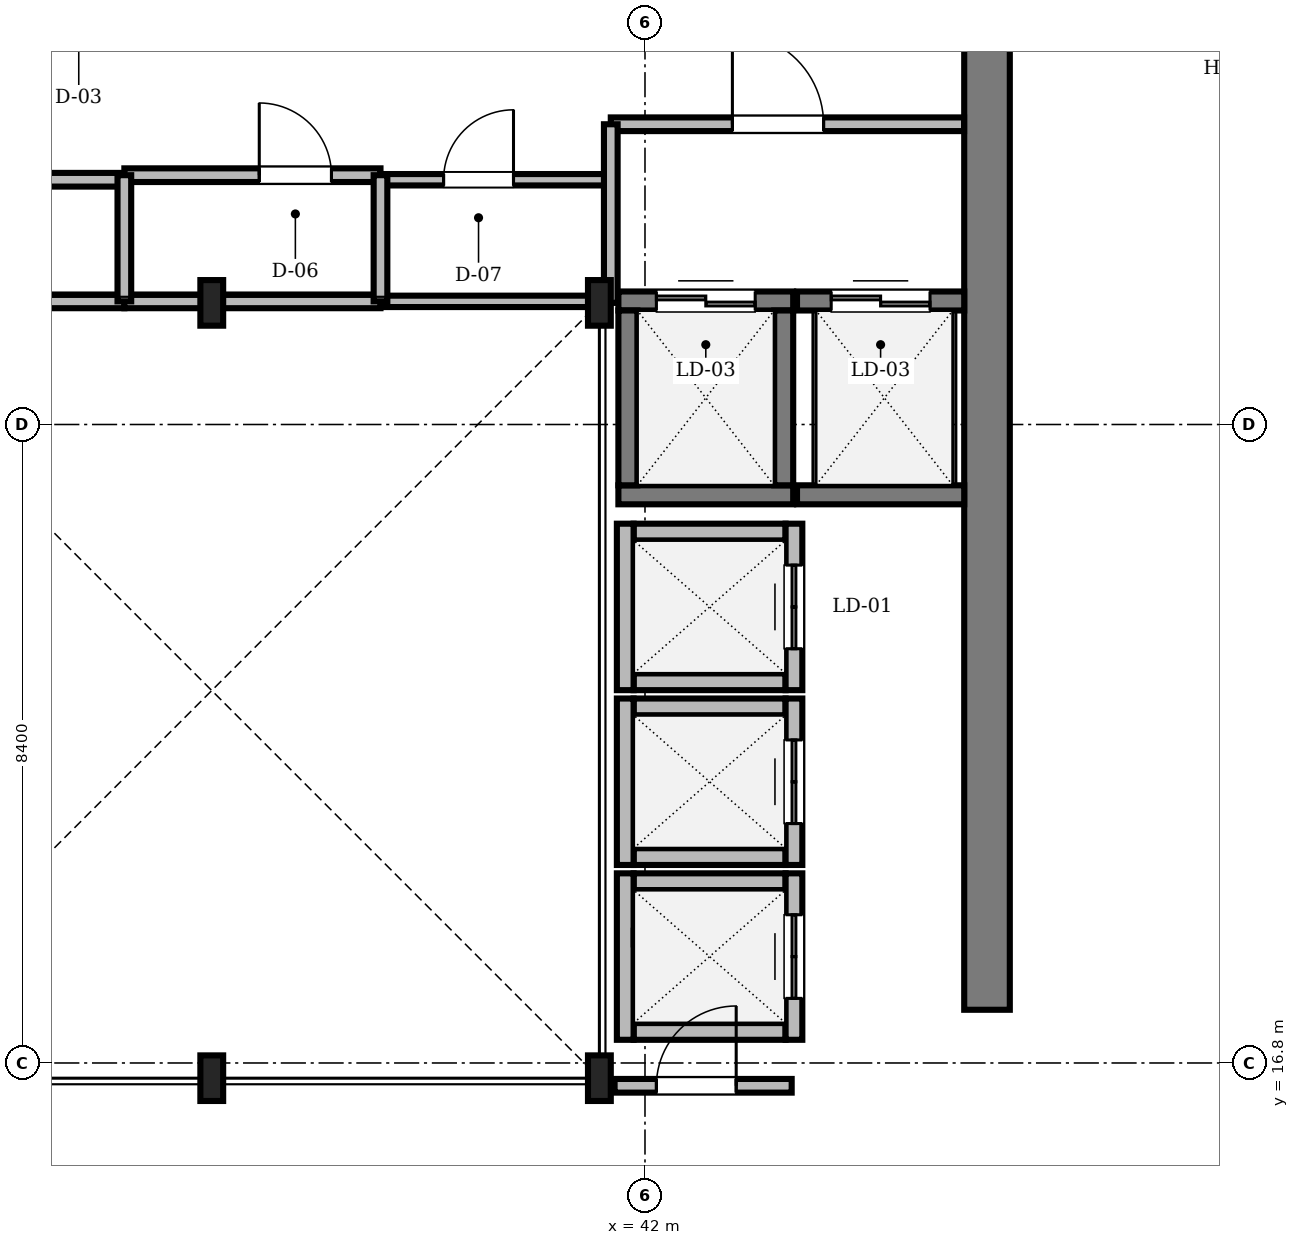
"""IFC4 building model, lengths in metres.
Left out: names, types, materials, properties, quantities, classifications, styles, units other than length and angle.
Written with IfcOpenShell. Run it as: python <this file> out.ifc"""

import sys

from ifc_helpers import new_model, si_unit, direction, frame, frame_2d, origin, origin_2d, place, context, subcontext, project, spatial, rectangle, i_section, extrude, source, transform, mapped, element, fill, save


model = new_model("IFC4")
c1 = context("Model", 3, precision=1e-05, world=origin(), true_north=direction((0.0, 1.0)))
c2 = subcontext(c1, "Body", "Model", "MODEL_VIEW")
j1 = project(units=[si_unit("LENGTHUNIT", "METRE"), si_unit("PLANEANGLEUNIT", "RADIAN")], contexts=[c1])
p1 = place(None, origin())
s1 = spatial("IfcSite", under=j1, at=p1, CompositionType="ELEMENT")
p2 = place(p1, origin())
s2 = spatial("IfcBuilding", under=s1, at=p2, CompositionType="ELEMENT")
p3 = place(p2, frame((0.0, 0.0, 266.4)))
s3 = spatial("IfcBuildingStorey", under=s2, at=p3, CompositionType="ELEMENT", Elevation=266.4)
m1 = source(origin(), c2, "Body", "SweptSolid", [
    extrude(rectangle(XDim=13.15, YDim=0.6, at=frame_2d((6.575, 0.0))), origin(), (0.0, 0.0, 1.0), 3.65),
])
p4 = place(p3, frame((46.5, 17.5, 0.0), z_axis=(0.0, 0.0, 1.0), x_axis=(0.0, 1.0, 0.0)))
e1 = element("IfcWall", 1, at=p4, inside=s3, PredefinedType="SHEAR", context=c2, shape_type="MappedRepresentation", body=[
    mapped(m1, transform((0.0, 0.0, 0.0), scale=1.0)),
])
m2 = source(origin(), c2, "Body", "SweptSolid", [
    extrude(i_section(OverallWidth=0.3, OverallDepth=0.6, WebThickness=0.015, FlangeThickness=0.03, FilletRadius=0.027, at=origin_2d()), origin(), (0.0, 0.0, 1.0), 3.65),
])
for number, where, z_axis, x_axis in (
    (2, (36.3, 16.6, 0.0), (0.0, 0.0, 1.0), (1.0, 0.0, 0.0)),
    (3, (41.4, 16.6, 0.0), (0.0, 0.0, 1.0), (1.0, 0.0, 0.0)),
    (4, (41.4, 26.8, 0.0), (0.0, 0.0, 1.0), (1.0, 0.0, 0.0)),
    (5, (36.3, 26.8, 0.0), (0.0, 0.0, 1.0), (1.0, 0.0, 0.0)),
):
    element("IfcColumn", number, at=place(p3, frame(where, z_axis=z_axis, x_axis=x_axis)), inside=s3, PredefinedType="COLUMN", context=c2, shape_type="MappedRepresentation", body=[
        mapped(m2, transform((0.0, 0.0, 0.0), scale=1.0)),
    ])
m3 = source(origin(), c2, "Body", "SweptSolid", [
    extrude(rectangle(XDim=2.0, YDim=0.22, at=frame_2d((1.0, 0.0))), origin(), (0.0, 0.0, 1.0), 3.65),
])
for number, where, z_axis, x_axis in (
    (6, (41.85, 21.815, 0.0), (0.0, 0.0, 1.0), (1.0, 0.0, 0.0)),
    (7, (41.85, 23.785, 0.0), (0.0, 0.0, 1.0), (1.0, 0.0, 0.0)),
):
    element("IfcWall", number, at=place(p3, frame(where, z_axis=z_axis, x_axis=x_axis)), inside=s3, PredefinedType="SOLIDWALL", context=c2, shape_type="MappedRepresentation", body=[
        mapped(m3, transform((0.0, 0.0, 0.0), scale=1.0)),
    ])
m4 = source(origin(), c2, "Body", "SweptSolid", [
    extrude(rectangle(XDim=2.19, YDim=0.22, at=frame_2d((1.095, 0.0))), origin(), (0.0, 0.0, 1.0), 3.65),
])
p5 = place(p3, frame((41.74, 21.705, 0.0), z_axis=(0.0, 0.0, 1.0), x_axis=(0.0, 1.0, 0.0)))
e8 = element("IfcWall", 8, at=p5, inside=s3, PredefinedType="SOLIDWALL", context=c2, shape_type="MappedRepresentation", body=[
    mapped(m4, transform((0.0, 0.0, 0.0), scale=1.0)),
])
p6 = place(p3, frame((43.96, 21.705, 0.0), z_axis=(0.0, 0.0, 1.0), x_axis=(0.0, 1.0, 0.0)))
e9 = element("IfcWall", 9, at=p6, inside=s3, PredefinedType="SOLIDWALL", context=c2, shape_type="MappedRepresentation", body=[
    mapped(m4, transform((0.0, 0.0, 0.0), scale=1.0)),
])
m5 = source(origin(), c2, "Body", "SweptSolid", [
    extrude(rectangle(XDim=1.1, YDim=2.2, at=frame_2d((0.55, 1.1))), frame((0.0, 0.12, 0.0), z_axis=(0.0, -1.0, 0.0), x_axis=(1.0, 0.0, 0.0)), (0.0, 0.0, 1.0), 0.24),
])
p7 = place(p6, frame((0.545, 0.0, 0.0)))
e10 = element("IfcOpeningElement", 10, at=p7, cuts=e9, PredefinedType="OPENING", context=c2, shape_type="MappedRepresentation", body=[
    mapped(m5, transform((0.0, 0.0, 0.0), scale=1.0)),
])
for number, where, z_axis, x_axis in (
    (11, (41.85, 19.515, 0.0), (0.0, 0.0, 1.0), (1.0, 0.0, 0.0)),
    (12, (41.85, 21.485, 0.0), (0.0, 0.0, 1.0), (1.0, 0.0, 0.0)),
):
    element("IfcWall", number, at=place(p3, frame(where, z_axis=z_axis, x_axis=x_axis)), inside=s3, PredefinedType="SOLIDWALL", context=c2, shape_type="MappedRepresentation", body=[
        mapped(m3, transform((0.0, 0.0, 0.0), scale=1.0)),
    ])
p8 = place(p3, frame((41.74, 19.405, 0.0), z_axis=(0.0, 0.0, 1.0), x_axis=(0.0, 1.0, 0.0)))
e13 = element("IfcWall", 13, at=p8, inside=s3, PredefinedType="SOLIDWALL", context=c2, shape_type="MappedRepresentation", body=[
    mapped(m4, transform((0.0, 0.0, 0.0), scale=1.0)),
])
p9 = place(p3, frame((43.96, 19.405, 0.0), z_axis=(0.0, 0.0, 1.0), x_axis=(0.0, 1.0, 0.0)))
e14 = element("IfcWall", 14, at=p9, inside=s3, PredefinedType="SOLIDWALL", context=c2, shape_type="MappedRepresentation", body=[
    mapped(m4, transform((0.0, 0.0, 0.0), scale=1.0)),
])
p10 = place(p9, frame((0.545, 0.0, 0.0)))
e15 = element("IfcOpeningElement", 15, at=p10, cuts=e14, PredefinedType="OPENING", context=c2, shape_type="MappedRepresentation", body=[
    mapped(m5, transform((0.0, 0.0, 0.0), scale=1.0)),
])
for number, where, z_axis, x_axis in (
    (16, (41.85, 17.215, 0.0), (0.0, 0.0, 1.0), (1.0, 0.0, 0.0)),
    (17, (41.85, 19.185, 0.0), (0.0, 0.0, 1.0), (1.0, 0.0, 0.0)),
):
    element("IfcWall", number, at=place(p3, frame(where, z_axis=z_axis, x_axis=x_axis)), inside=s3, PredefinedType="SOLIDWALL", context=c2, shape_type="MappedRepresentation", body=[
        mapped(m3, transform((0.0, 0.0, 0.0), scale=1.0)),
    ])
p11 = place(p3, frame((41.74, 17.105, 0.0), z_axis=(0.0, 0.0, 1.0), x_axis=(0.0, 1.0, 0.0)))
e18 = element("IfcWall", 18, at=p11, inside=s3, PredefinedType="SOLIDWALL", context=c2, shape_type="MappedRepresentation", body=[
    mapped(m4, transform((0.0, 0.0, 0.0), scale=1.0)),
])
p12 = place(p3, frame((43.96, 17.105, 0.0), z_axis=(0.0, 0.0, 1.0), x_axis=(0.0, 1.0, 0.0)))
e19 = element("IfcWall", 19, at=p12, inside=s3, PredefinedType="SOLIDWALL", context=c2, shape_type="MappedRepresentation", body=[
    mapped(m4, transform((0.0, 0.0, 0.0), scale=1.0)),
])
p13 = place(p12, frame((0.545, 0.0, 0.0)))
e20 = element("IfcOpeningElement", 20, at=p13, cuts=e19, PredefinedType="OPENING", context=c2, shape_type="MappedRepresentation", body=[
    mapped(m5, transform((0.0, 0.0, 0.0), scale=1.0)),
])
m6 = source(origin(), c2, "Body", "SweptSolid", [
    extrude(rectangle(XDim=2.3, YDim=0.25, at=frame_2d((1.15, 0.0))), origin(), (0.0, 0.0, 1.0), 3.65),
])
p14 = place(p3, frame((41.65, 24.275, 0.0), z_axis=(0.0, 0.0, 1.0), x_axis=(1.0, 0.0, 0.0)))
e21 = element("IfcWall", 21, at=p14, inside=s3, PredefinedType="SOLIDWALL", context=c2, shape_type="MappedRepresentation", body=[
    mapped(m6, transform((0.0, 0.0, 0.0), scale=1.0)),
])
p15 = place(p3, frame((41.65, 26.825, 0.0), z_axis=(0.0, 0.0, 1.0), x_axis=(1.0, 0.0, 0.0)))
e22 = element("IfcWall", 22, at=p15, inside=s3, PredefinedType="SOLIDWALL", context=c2, shape_type="MappedRepresentation", body=[
    mapped(m6, transform((0.0, 0.0, 0.0), scale=1.0)),
])
m7 = source(origin(), c2, "Body", "SweptSolid", [
    extrude(rectangle(XDim=1.3, YDim=2.3, at=frame_2d((0.65, 1.15))), frame((0.0, 0.135, 0.0), z_axis=(0.0, -1.0, 0.0), x_axis=(1.0, 0.0, 0.0)), (0.0, 0.0, 1.0), 0.27),
])
p16 = place(p15, frame((0.5, 0.0, 0.0)))
e23 = element("IfcOpeningElement", 23, at=p16, cuts=e22, PredefinedType="OPENING", context=c2, shape_type="MappedRepresentation", body=[
    mapped(m7, transform((0.0, 0.0, 0.0), scale=1.0)),
])
for number, where, z_axis, x_axis in (
    (24, (41.775, 24.4, 0.0), (0.0, 0.0, 1.0), (0.0, 1.0, 0.0)),
    (25, (43.825, 24.4, 0.0), (0.0, 0.0, 1.0), (0.0, 1.0, 0.0)),
):
    element("IfcWall", number, at=place(p3, frame(where, z_axis=z_axis, x_axis=x_axis)), inside=s3, PredefinedType="SOLIDWALL", context=c2, shape_type="MappedRepresentation", body=[
        mapped(m6, transform((0.0, 0.0, 0.0), scale=1.0)),
    ])
m8 = source(origin(), c2, "Body", "SweptSolid", [
    extrude(rectangle(XDim=2.2, YDim=0.25, at=frame_2d((1.1, 0.0))), origin(), (0.0, 0.0, 1.0), 3.65),
])
p17 = place(p3, frame((44.0, 24.275, 0.0), z_axis=(0.0, 0.0, 1.0), x_axis=(1.0, 0.0, 0.0)))
e26 = element("IfcWall", 26, at=p17, inside=s3, PredefinedType="SOLIDWALL", context=c2, shape_type="MappedRepresentation", body=[
    mapped(m8, transform((0.0, 0.0, 0.0), scale=1.0)),
])
p18 = place(p3, frame((44.0, 26.825, 0.0), z_axis=(0.0, 0.0, 1.0), x_axis=(1.0, 0.0, 0.0)))
e27 = element("IfcWall", 27, at=p18, inside=s3, PredefinedType="SOLIDWALL", context=c2, shape_type="MappedRepresentation", body=[
    mapped(m8, transform((0.0, 0.0, 0.0), scale=1.0)),
])
p19 = place(p18, frame((0.45, 0.0, 0.0)))
e28 = element("IfcOpeningElement", 28, at=p19, cuts=e27, PredefinedType="OPENING", context=c2, shape_type="MappedRepresentation", body=[
    mapped(m7, transform((0.0, 0.0, 0.0), scale=1.0)),
])
m9 = source(origin(), c2, "Body", "SweptSolid", [
    extrude(rectangle(XDim=4.648, YDim=0.18, at=frame_2d((2.324, 0.0))), origin(), (0.0, 0.0, 1.0), 3.282),
])
p20 = place(p3, frame((41.55, 29.15, 0.0), z_axis=(0.0, 0.0, 1.0), x_axis=(1.0, 0.0, 0.0)))
e29 = element("IfcWall", 29, at=p20, inside=s3, PredefinedType="PARTITIONING", context=c2, shape_type="MappedRepresentation", body=[
    mapped(m9, transform((0.0, 0.0, 0.0), scale=1.0)),
])
m10 = source(origin(), c2, "Body", "SweptSolid", [
    extrude(rectangle(XDim=1.2, YDim=2.2, at=frame_2d((0.6, 1.1))), frame((0.0, 0.1, 0.0), z_axis=(0.0, -1.0, 0.0), x_axis=(1.0, 0.0, 0.0)), (0.0, 0.0, 1.0), 0.2),
])
p21 = place(p20, frame((1.6, 0.0, 0.0)))
e30 = element("IfcOpeningElement", 30, at=p21, cuts=e29, PredefinedType="OPENING", context=c2, shape_type="MappedRepresentation", body=[
    mapped(m10, transform((0.0, 0.0, 0.0), scale=1.0)),
])
m11 = source(origin(), c2, "Body", "SweptSolid", [
    extrude(rectangle(XDim=3.7, YDim=0.18, at=frame_2d((1.85, 0.0))), origin(), (0.0, 0.0, 1.0), 3.282),
])
p22 = place(p3, frame((31.45, 28.42, 0.0), z_axis=(0.0, 0.0, 1.0), x_axis=(1.0, 0.0, 0.0)))
e31 = element("IfcWall", 31, at=p22, inside=s3, PredefinedType="PARTITIONING", context=c2, shape_type="MappedRepresentation", body=[
    mapped(m11, transform((0.0, 0.0, 0.0), scale=1.0)),
])
m12 = source(origin(), c2, "Body", "SweptSolid", [
    extrude(rectangle(XDim=0.92, YDim=2.1, at=frame_2d((0.46, 1.05))), frame((0.0, 0.1, 0.0), z_axis=(0.0, -1.0, 0.0), x_axis=(1.0, 0.0, 0.0)), (0.0, 0.0, 1.0), 0.2),
])
p23 = place(p22, frame((0.9, 0.0, 0.0)))
e32 = element("IfcOpeningElement", 32, at=p23, cuts=e31, PredefinedType="OPENING", context=c2, shape_type="MappedRepresentation", body=[
    mapped(m12, transform((0.0, 0.0, 0.0), scale=1.0)),
])
m13 = source(origin(), c2, "Body", "SweptSolid", [
    extrude(rectangle(XDim=3.37, YDim=0.18, at=frame_2d((1.685, 0.0))), origin(), (0.0, 0.0, 1.0), 3.65),
])
p24 = place(p3, frame((35.15, 28.48, 0.0), z_axis=(0.0, 0.0, 1.0), x_axis=(1.0, 0.0, 0.0)))
e33 = element("IfcWall", 33, at=p24, inside=s3, PredefinedType="PARTITIONING", context=c2, shape_type="MappedRepresentation", body=[
    mapped(m13, transform((0.0, 0.0, 0.0), scale=1.0)),
])
m14 = source(origin(), c2, "Body", "SweptSolid", [
    extrude(rectangle(XDim=0.95, YDim=2.15, at=frame_2d((0.475, 1.075))), frame((0.0, 0.1, 0.0), z_axis=(0.0, -1.0, 0.0), x_axis=(1.0, 0.0, 0.0)), (0.0, 0.0, 1.0), 0.2),
])
p25 = place(p24, frame((1.775, 0.0, 0.0)))
e34 = element("IfcOpeningElement", 34, at=p25, cuts=e33, PredefinedType="OPENING", context=c2, shape_type="MappedRepresentation", body=[
    mapped(m14, transform((0.0, 0.0, 0.0), scale=1.0)),
])
m15 = source(origin(), c2, "Body", "SweptSolid", [
    extrude(rectangle(XDim=3.0, YDim=0.15, at=frame_2d((1.5, 0.0))), origin(), (0.0, 0.0, 1.0), 3.65),
])
p26 = place(p3, frame((38.52, 28.42, 0.0), z_axis=(0.0, 0.0, 1.0), x_axis=(1.0, 0.0, 0.0)))
e35 = element("IfcWall", 35, at=p26, inside=s3, PredefinedType="PARTITIONING", context=c2, shape_type="MappedRepresentation", body=[
    mapped(m15, transform((0.0, 0.0, 0.0), scale=1.0)),
])
m16 = source(origin(), c2, "Body", "SweptSolid", [
    extrude(rectangle(XDim=0.92, YDim=2.1, at=frame_2d((0.46, 1.05))), frame((0.0, 0.085, 0.0), z_axis=(0.0, -1.0, 0.0), x_axis=(1.0, 0.0, 0.0)), (0.0, 0.0, 1.0), 0.17),
])
p27 = place(p26, frame((0.83, 0.0, 0.0)))
e36 = element("IfcOpeningElement", 36, at=p27, cuts=e35, PredefinedType="OPENING", context=c2, shape_type="MappedRepresentation", body=[
    mapped(m16, transform((0.0, 0.0, 0.0), scale=1.0)),
])
m17 = source(origin(), c2, "Body", "SweptSolid", [
    extrude(rectangle(XDim=2.33, YDim=0.18, at=frame_2d((1.165, 0.0))), origin(), (0.0, 0.0, 1.0), 3.092),
])
p28 = place(p3, frame((41.6, 16.5, 0.0), z_axis=(0.0, 0.0, 1.0), x_axis=(1.0, 0.0, 0.0)))
e37 = element("IfcWall", 37, at=p28, inside=s3, PredefinedType="PARTITIONING", context=c2, shape_type="MappedRepresentation", body=[
    mapped(m17, transform((0.0, 0.0, 0.0), scale=1.0)),
])
m18 = source(origin(), c2, "Body", "SweptSolid", [
    extrude(rectangle(XDim=1.05, YDim=2.2, at=frame_2d((0.525, 1.1))), frame((0.0, 0.1, 0.0), z_axis=(0.0, -1.0, 0.0), x_axis=(1.0, 0.0, 0.0)), (0.0, 0.0, 1.0), 0.2),
])
p29 = place(p28, frame((0.55, 0.0, 0.0)))
e38 = element("IfcOpeningElement", 38, at=p29, cuts=e37, PredefinedType="OPENING", context=c2, shape_type="MappedRepresentation", body=[
    mapped(m18, transform((0.0, 0.0, 0.0), scale=1.0)),
])
m19 = source(origin(), c2, "Body", "SweptSolid", [
    extrude(rectangle(XDim=3.7, YDim=0.18, at=frame_2d((1.85, 0.0))), origin(), (0.0, 0.0, 1.0), 3.192),
])
p30 = place(p3, frame((31.45, 26.82, 0.0), z_axis=(0.0, 0.0, 1.0), x_axis=(1.0, 0.0, 0.0)))
e39 = element("IfcWall", 39, at=p30, inside=s3, PredefinedType="PARTITIONING", context=c2, shape_type="MappedRepresentation", body=[
    mapped(m19, transform((0.0, 0.0, 0.0), scale=1.0)),
])
m20 = source(origin(), c2, "Body", "SweptSolid", [
    extrude(rectangle(XDim=3.37, YDim=0.18, at=frame_2d((1.685, 0.0))), origin(), (0.0, 0.0, 1.0), 3.192),
])
p31 = place(p3, frame((35.15, 26.82, 0.0), z_axis=(0.0, 0.0, 1.0), x_axis=(1.0, 0.0, 0.0)))
e40 = element("IfcWall", 40, at=p31, inside=s3, PredefinedType="PARTITIONING", context=c2, shape_type="MappedRepresentation", body=[
    mapped(m20, transform((0.0, 0.0, 0.0), scale=1.0)),
])
m21 = source(origin(), c2, "Body", "SweptSolid", [
    extrude(rectangle(XDim=3.0, YDim=0.15, at=frame_2d((1.5, 0.0))), origin(), (0.0, 0.0, 1.0), 3.192),
])
p32 = place(p3, frame((38.52, 26.82, 0.0), z_axis=(0.0, 0.0, 1.0), x_axis=(1.0, 0.0, 0.0)))
e41 = element("IfcWall", 41, at=p32, inside=s3, PredefinedType="PARTITIONING", context=c2, shape_type="MappedRepresentation", body=[
    mapped(m21, transform((0.0, 0.0, 0.0), scale=1.0)),
])
m22 = source(origin(), c2, "Body", "SweptSolid", [
    extrude(rectangle(XDim=2.35, YDim=0.18, at=frame_2d((1.175, 0.0))), origin(), (0.0, 0.0, 1.0), 3.282),
])
p33 = place(p3, frame((41.55, 26.8, 0.0), z_axis=(0.0, 0.0, 1.0), x_axis=(0.0, 1.0, 0.0)))
e42 = element("IfcWall", 42, at=p33, inside=s3, PredefinedType="PARTITIONING", context=c2, shape_type="MappedRepresentation", body=[
    mapped(m22, transform((0.0, 0.0, 0.0), scale=1.0)),
])
m23 = source(origin(), c2, "Body", "SweptSolid", [
    extrude(rectangle(XDim=1.858, YDim=0.18, at=frame_2d((0.929, 0.0))), origin(), (0.0, 0.0, 1.0), 3.65),
])
p34 = place(p3, frame((41.852, 18.45, 0.0), z_axis=(0.0, 0.0, 1.0), x_axis=(1.0, 0.0, 0.0)))
e43 = element("IfcWall", 43, at=p34, inside=s3, PredefinedType="PARTITIONING", context=c2, shape_type="MappedRepresentation", body=[
    mapped(m23, transform((0.0, 0.0, 0.0), scale=1.0)),
])
m24 = source(origin(), c2, "Body", "SweptSolid", [
    extrude(rectangle(XDim=1.66, YDim=0.18, at=frame_2d((0.83, 0.0))), origin(), (0.0, 0.0, 1.0), 3.192),
])
for number, where, z_axis, x_axis in (
    (44, (35.15, 26.82, 0.0), (0.0, 0.0, 1.0), (0.0, 1.0, 0.0)),
    (45, (38.52, 26.82, 0.0), (0.0, 0.0, 1.0), (0.0, 1.0, 0.0)),
):
    element("IfcWall", number, at=place(p3, frame(where, z_axis=z_axis, x_axis=x_axis)), inside=s3, PredefinedType="PARTITIONING", context=c2, shape_type="MappedRepresentation", body=[
        mapped(m24, transform((0.0, 0.0, 0.0), scale=1.0)),
    ])
m25 = source(origin(), c2, "Body", "SweptSolid", [
    extrude(rectangle(XDim=1.1, YDim=2.2, at=frame_2d((0.55, 1.1))), frame((0.0, 0.025, 0.0), z_axis=(0.0, -1.0, 0.0), x_axis=(1.0, 0.0, 0.0)), (0.0, 0.0, 1.0), 0.05),
])
p35 = place(p7, origin())
e46 = element("IfcDoor", 46, at=p35, inside=s3, OperationType="DOUBLE_DOOR_SLIDING", PredefinedType="DOOR", context=c2, shape_type="MappedRepresentation", body=[
    mapped(m25, transform((0.0, 0.0, 0.0), scale=1.0)),
])
fill(e10, e46)
p36 = place(p10, origin())
e47 = element("IfcDoor", 47, at=p36, inside=s3, OperationType="DOUBLE_DOOR_SLIDING", PredefinedType="DOOR", context=c2, shape_type="MappedRepresentation", body=[
    mapped(m25, transform((0.0, 0.0, 0.0), scale=1.0)),
])
fill(e15, e47)
p37 = place(p13, origin())
e48 = element("IfcDoor", 48, at=p37, inside=s3, OperationType="DOUBLE_DOOR_SLIDING", PredefinedType="DOOR", context=c2, shape_type="MappedRepresentation", body=[
    mapped(m25, transform((0.0, 0.0, 0.0), scale=1.0)),
])
fill(e20, e48)
m26 = source(origin(), c2, "Body", "SweptSolid", [
    extrude(rectangle(XDim=1.3, YDim=2.3, at=frame_2d((0.65, 1.15))), frame((0.0, 0.025, 0.0), z_axis=(0.0, -1.0, 0.0), x_axis=(1.0, 0.0, 0.0)), (0.0, 0.0, 1.0), 0.05),
])
p38 = place(p16, origin())
e49 = element("IfcDoor", 49, at=p38, inside=s3, OperationType="DOUBLE_DOOR_SLIDING", PredefinedType="DOOR", context=c2, shape_type="MappedRepresentation", body=[
    mapped(m26, transform((0.0, 0.0, 0.0), scale=1.0)),
])
fill(e23, e49)
p39 = place(p19, origin())
e50 = element("IfcDoor", 50, at=p39, inside=s3, OperationType="DOUBLE_DOOR_SLIDING", PredefinedType="DOOR", context=c2, shape_type="MappedRepresentation", body=[
    mapped(m26, transform((0.0, 0.0, 0.0), scale=1.0)),
])
fill(e28, e50)
m27 = source(origin(), c2, "Body", "SweptSolid", [
    extrude(rectangle(XDim=1.2, YDim=2.2, at=frame_2d((0.6, 1.1))), frame((0.0, 0.025, 0.0), z_axis=(0.0, -1.0, 0.0), x_axis=(1.0, 0.0, 0.0)), (0.0, 0.0, 1.0), 0.05),
])
p40 = place(p21, origin())
e51 = element("IfcDoor", 51, at=p40, inside=s3, OperationType="SINGLE_SWING_LEFT", PredefinedType="DOOR", context=c2, shape_type="MappedRepresentation", body=[
    mapped(m27, transform((0.0, 0.0, 0.0), scale=1.0)),
])
fill(e30, e51)
m28 = source(origin(), c2, "Body", "SweptSolid", [
    extrude(rectangle(XDim=0.95, YDim=2.15, at=frame_2d((0.475, 1.075))), frame((0.0, 0.025, 0.0), z_axis=(0.0, -1.0, 0.0), x_axis=(1.0, 0.0, 0.0)), (0.0, 0.0, 1.0), 0.05),
])
p41 = place(p25, origin())
e52 = element("IfcDoor", 52, at=p41, inside=s3, OperationType="SINGLE_SWING_LEFT", PredefinedType="DOOR", context=c2, shape_type="MappedRepresentation", body=[
    mapped(m28, transform((0.0, 0.0, 0.0), scale=1.0)),
])
fill(e34, e52)
m29 = source(origin(), c2, "Body", "SweptSolid", [
    extrude(rectangle(XDim=0.92, YDim=2.1, at=frame_2d((0.46, 1.05))), frame((0.0, 0.025, 0.0), z_axis=(0.0, -1.0, 0.0), x_axis=(1.0, 0.0, 0.0)), (0.0, 0.0, 1.0), 0.05),
])
p42 = place(p27, origin())
e53 = element("IfcDoor", 53, at=p42, inside=s3, OperationType="SINGLE_SWING_RIGHT", PredefinedType="DOOR", context=c2, shape_type="MappedRepresentation", body=[
    mapped(m29, transform((0.0, 0.0, 0.0), scale=1.0)),
])
fill(e36, e53)
m30 = source(origin(), c2, "Body", "SweptSolid", [
    extrude(rectangle(XDim=1.05, YDim=2.2, at=frame_2d((0.525, 1.1))), frame((0.0, 0.025, 0.0), z_axis=(0.0, -1.0, 0.0), x_axis=(1.0, 0.0, 0.0)), (0.0, 0.0, 1.0), 0.05),
])
p43 = place(p29, origin())
e54 = element("IfcDoor", 54, at=p43, inside=s3, OperationType="SINGLE_SWING_RIGHT", PredefinedType="DOOR", context=c2, shape_type="MappedRepresentation", body=[
    mapped(m30, transform((0.0, 0.0, 0.0), scale=1.0)),
])
fill(e38, e54)
save(model, sys.argv[1])
